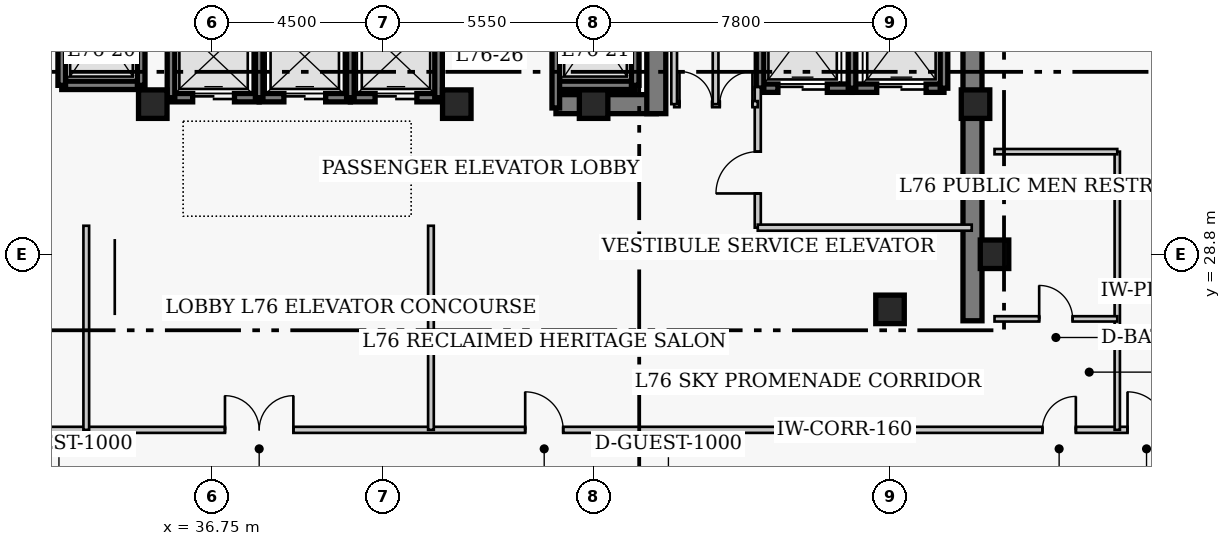
"""IFC4 building model, lengths in metres.
Left out: names, types, materials, properties, quantities, classifications, styles, units other than length and angle.
Written with IfcOpenShell. Run it as: python <this file> out.ifc"""

import sys

from ifc_helpers import new_model, si_unit, direction, frame, frame_2d, origin, origin_2d, place, context, subcontext, project, spatial, rectangle, extrude, element, fill, save


model = new_model("IFC4")
c1 = context("Model", 3, precision=1e-05, world=origin(), true_north=direction((0.0, 1.0)))
c2 = subcontext(c1, "Body", "Model", "MODEL_VIEW")
j1 = project(units=[si_unit("LENGTHUNIT", "METRE"), si_unit("PLANEANGLEUNIT", "RADIAN")], contexts=[c1])
p1 = place(None, origin())
s1 = spatial("IfcSite", under=j1, at=p1, CompositionType="ELEMENT")
p2 = place(p1, origin())
s2 = spatial("IfcBuilding", under=s1, at=p2, CompositionType="ELEMENT")
p3 = place(p2, frame((0.0, 0.0, 306.6)))
s3 = spatial("IfcBuildingStorey", under=s2, at=p3, CompositionType="ELEMENT", Elevation=306.6)
p4 = place(p3, frame((56.77, 27.05, 0.0), z_axis=(0.0, 0.0, 1.0), x_axis=(0.0, 1.0, 0.0)))
e1 = element("IfcWall", 1, at=p4, inside=s3, PredefinedType="SHEAR", context=c2, shape_type="SweptSolid", body=[
    extrude(rectangle(XDim=13.52, YDim=0.5, at=frame_2d((6.76, 0.0))), origin(), (0.0, 0.0, 1.0), 4.8),
])
p5 = place(p3, frame((45.81, 32.75, 0.0), z_axis=(0.0, 0.0, 1.0), x_axis=(1.0, 0.0, 0.0)))
e2 = element("IfcWall", 2, at=p5, inside=s3, PredefinedType="SHEAR", context=c2, shape_type="SweptSolid", body=[
    extrude(rectangle(XDim=2.64, YDim=0.5, at=frame_2d((1.32, 0.0))), origin(), (0.0, 0.0, 1.0), 4.8),
])
p6 = place(p3, frame((48.45, 32.5, 0.0), z_axis=(0.0, 0.0, 1.0), x_axis=(0.0, 1.0, 0.0)))
e3 = element("IfcWall", 3, at=p6, inside=s3, PredefinedType="SHEAR", context=c2, shape_type="SweptSolid", body=[
    extrude(rectangle(XDim=7.82, YDim=0.5, at=frame_2d((3.91, 0.0))), origin(), (0.0, 0.0, 1.0), 4.8),
])
p7 = place(p6, frame((5.7, 0.0, 0.0)))
e4 = element("IfcOpeningElement", 4, at=p7, cuts=e3, PredefinedType="OPENING", context=c2, shape_type="SweptSolid", body=[
    extrude(rectangle(XDim=1.1, YDim=2.15, at=frame_2d((0.55, 1.075))), frame((0.0, 0.26, 0.0), z_axis=(0.0, -1.0, 0.0), x_axis=(1.0, 0.0, 0.0)), (0.0, 0.0, 1.0), 0.52),
])
for number, where, z_axis, x_axis in (
    (5, (57.35, 28.8, 0.0), (0.0, 0.0, 1.0), (1.0, 0.0, 0.0)),
    (6, (35.2, 32.75, 0.0), (0.0, 0.0, 1.0), (1.0, 0.0, 0.0)),
    (7, (43.2, 32.75, 0.0), (0.0, 0.0, 1.0), (1.0, 0.0, 0.0)),
    (8, (46.8, 32.75, 0.0), (0.0, 0.0, 1.0), (1.0, 0.0, 0.0)),
    (9, (54.6, 27.35, 0.0), (0.0, 0.0, 1.0), (1.0, 0.0, 0.0)),
    (10, (56.85, 32.75, 0.0), (0.0, 0.0, 1.0), (1.0, 0.0, 0.0)),
):
    element("IfcColumn", number, at=place(p3, frame(where, z_axis=z_axis, x_axis=x_axis)), inside=s3, PredefinedType="COLUMN", context=c2, shape_type="SweptSolid", body=[
        extrude(rectangle(XDim=0.75, YDim=0.75, at=origin_2d()), origin(), (0.0, 0.0, 1.0), 4.8),
    ])
p8 = place(p3, frame((35.68, 32.92, 0.0), z_axis=(0.0, 0.0, 1.0), x_axis=(1.0, 0.0, 0.0)))
e11 = element("IfcWall", 11, at=p8, inside=s3, PredefinedType="SHEAR", context=c2, shape_type="SweptSolid", body=[
    extrude(rectangle(XDim=2.32, YDim=0.22, at=frame_2d((1.16, 0.0))), origin(), (0.0, 0.0, 1.0), 4.8),
])
p9 = place(p8, frame((0.57, 0.0, 0.0)))
e12 = element("IfcOpeningElement", 12, at=p9, cuts=e11, PredefinedType="OPENING", context=c2, shape_type="SweptSolid", body=[
    extrude(rectangle(XDim=1.1, YDim=2.15, at=frame_2d((0.55, 1.075))), frame((0.0, 0.12, 0.0), z_axis=(0.0, -1.0, 0.0), x_axis=(1.0, 0.0, 0.0)), (0.0, 0.0, 1.0), 0.24),
])
p10 = place(p3, frame((35.68, 32.92, 0.0), z_axis=(0.0, 0.0, 1.0), x_axis=(0.0, 1.0, 0.0)))
e13 = element("IfcWall", 13, at=p10, inside=s3, PredefinedType="SHEAR", context=c2, shape_type="SweptSolid", body=[
    extrude(rectangle(XDim=2.16, YDim=0.2, at=frame_2d((1.08, 0.0))), origin(), (0.0, 0.0, 1.0), 4.8),
])
p11 = place(p3, frame((38.0, 32.92, 0.0), z_axis=(0.0, 0.0, 1.0), x_axis=(1.0, 0.0, 0.0)))
e14 = element("IfcWall", 14, at=p11, inside=s3, PredefinedType="SHEAR", context=c2, shape_type="SweptSolid", body=[
    extrude(rectangle(XDim=2.4, YDim=0.22, at=frame_2d((1.2, 0.0))), origin(), (0.0, 0.0, 1.0), 4.8),
])
p12 = place(p11, frame((0.65, 0.0, 0.0)))
e15 = element("IfcOpeningElement", 15, at=p12, cuts=e14, PredefinedType="OPENING", context=c2, shape_type="SweptSolid", body=[
    extrude(rectangle(XDim=1.1, YDim=2.15, at=frame_2d((0.55, 1.075))), frame((0.0, 0.12, 0.0), z_axis=(0.0, -1.0, 0.0), x_axis=(1.0, 0.0, 0.0)), (0.0, 0.0, 1.0), 0.24),
])
p13 = place(p3, frame((38.0, 32.92, 0.0), z_axis=(0.0, 0.0, 1.0), x_axis=(0.0, 1.0, 0.0)))
e16 = element("IfcWall", 16, at=p13, inside=s3, PredefinedType="SHEAR", context=c2, shape_type="SweptSolid", body=[
    extrude(rectangle(XDim=2.16, YDim=0.2, at=frame_2d((1.08, 0.0))), origin(), (0.0, 0.0, 1.0), 4.8),
])
p14 = place(p3, frame((40.4, 32.92, 0.0), z_axis=(0.0, 0.0, 1.0), x_axis=(1.0, 0.0, 0.0)))
e17 = element("IfcWall", 17, at=p14, inside=s3, PredefinedType="SHEAR", context=c2, shape_type="SweptSolid", body=[
    extrude(rectangle(XDim=2.32, YDim=0.22, at=frame_2d((1.16, 0.0))), origin(), (0.0, 0.0, 1.0), 4.8),
])
p15 = place(p14, frame((0.65, 0.0, 0.0)))
e18 = element("IfcOpeningElement", 18, at=p15, cuts=e17, PredefinedType="OPENING", context=c2, shape_type="SweptSolid", body=[
    extrude(rectangle(XDim=1.1, YDim=2.15, at=frame_2d((0.55, 1.075))), frame((0.0, 0.12, 0.0), z_axis=(0.0, -1.0, 0.0), x_axis=(1.0, 0.0, 0.0)), (0.0, 0.0, 1.0), 0.24),
])
for number, where, z_axis, x_axis in (
    (19, (40.4, 32.92, 0.0), (0.0, 0.0, 1.0), (0.0, 1.0, 0.0)),
    (20, (42.72, 32.92, 0.0), (0.0, 0.0, 1.0), (0.0, 1.0, 0.0)),
):
    element("IfcWall", number, at=place(p3, frame(where, z_axis=z_axis, x_axis=x_axis)), inside=s3, PredefinedType="SHEAR", context=c2, shape_type="SweptSolid", body=[
        extrude(rectangle(XDim=2.16, YDim=0.2, at=frame_2d((1.08, 0.0))), origin(), (0.0, 0.0, 1.0), 4.8),
    ])
p16 = place(p3, frame((51.18, 33.17, 0.0), z_axis=(0.0, 0.0, 1.0), x_axis=(1.0, 0.0, 0.0)))
e21 = element("IfcWall", 21, at=p16, inside=s3, PredefinedType="SHEAR", context=c2, shape_type="SweptSolid", body=[
    extrude(rectangle(XDim=2.42, YDim=0.22, at=frame_2d((1.21, 0.0))), origin(), (0.0, 0.0, 1.0), 4.8),
])
p17 = place(p16, frame((0.47, 0.0, 0.0)))
e22 = element("IfcOpeningElement", 22, at=p17, cuts=e21, PredefinedType="OPENING", context=c2, shape_type="SweptSolid", body=[
    extrude(rectangle(XDim=1.3, YDim=2.15, at=frame_2d((0.65, 1.075))), frame((0.0, 0.12, 0.0), z_axis=(0.0, -1.0, 0.0), x_axis=(1.0, 0.0, 0.0)), (0.0, 0.0, 1.0), 0.24),
])
p18 = place(p3, frame((51.18, 33.17, 0.0), z_axis=(0.0, 0.0, 1.0), x_axis=(0.0, 1.0, 0.0)))
e23 = element("IfcWall", 23, at=p18, inside=s3, PredefinedType="SHEAR", context=c2, shape_type="SweptSolid", body=[
    extrude(rectangle(XDim=2.86, YDim=0.2, at=frame_2d((1.43, 0.0))), origin(), (0.0, 0.0, 1.0), 4.8),
])
p19 = place(p3, frame((53.6, 33.17, 0.0), z_axis=(0.0, 0.0, 1.0), x_axis=(1.0, 0.0, 0.0)))
e24 = element("IfcWall", 24, at=p19, inside=s3, PredefinedType="SHEAR", context=c2, shape_type="SweptSolid", body=[
    extrude(rectangle(XDim=2.42, YDim=0.22, at=frame_2d((1.21, 0.0))), origin(), (0.0, 0.0, 1.0), 4.8),
])
p20 = place(p19, frame((0.65, 0.0, 0.0)))
e25 = element("IfcOpeningElement", 25, at=p20, cuts=e24, PredefinedType="OPENING", context=c2, shape_type="SweptSolid", body=[
    extrude(rectangle(XDim=1.3, YDim=2.15, at=frame_2d((0.65, 1.075))), frame((0.0, 0.12, 0.0), z_axis=(0.0, -1.0, 0.0), x_axis=(1.0, 0.0, 0.0)), (0.0, 0.0, 1.0), 0.24),
])
for number, where, z_axis, x_axis in (
    (26, (53.6, 33.17, 0.0), (0.0, 0.0, 1.0), (0.0, 1.0, 0.0)),
    (27, (56.02, 33.17, 0.0), (0.0, 0.0, 1.0), (0.0, 1.0, 0.0)),
):
    element("IfcWall", number, at=place(p3, frame(where, z_axis=z_axis, x_axis=x_axis)), inside=s3, PredefinedType="SHEAR", context=c2, shape_type="SweptSolid", body=[
        extrude(rectangle(XDim=2.86, YDim=0.2, at=frame_2d((1.43, 0.0))), origin(), (0.0, 0.0, 1.0), 4.8),
    ])
p21 = place(p3, frame((32.805, 33.245, 0.0), z_axis=(0.0, 0.0, 1.0), x_axis=(1.0, 0.0, 0.0)))
e28 = element("IfcWall", 28, at=p21, inside=s3, PredefinedType="SHEAR", context=c2, shape_type="SweptSolid", body=[
    extrude(rectangle(XDim=2.09, YDim=0.22, at=frame_2d((1.045, 0.0))), origin(), (0.0, 0.0, 1.0), 4.8),
])
for number, where, z_axis, x_axis in (
    (29, (32.805, 33.245, 0.0), (0.0, 0.0, 1.0), (0.0, 1.0, 0.0)),
    (30, (34.895, 33.245, 0.0), (0.0, 0.0, 1.0), (0.0, 1.0, 0.0)),
):
    element("IfcWall", number, at=place(p3, frame(where, z_axis=z_axis, x_axis=x_axis)), inside=s3, PredefinedType="SHEAR", context=c2, shape_type="SweptSolid", body=[
        extrude(rectangle(XDim=2.91, YDim=0.2, at=frame_2d((1.455, 0.0))), origin(), (0.0, 0.0, 1.0), 4.8),
    ])
p22 = place(p3, frame((45.805, 33.245, 0.0), z_axis=(0.0, 0.0, 1.0), x_axis=(1.0, 0.0, 0.0)))
e31 = element("IfcWall", 31, at=p22, inside=s3, PredefinedType="SHEAR", context=c2, shape_type="SweptSolid", body=[
    extrude(rectangle(XDim=2.09, YDim=0.22, at=frame_2d((1.045, 0.0))), origin(), (0.0, 0.0, 1.0), 4.8),
])
p23 = place(p3, frame((45.805, 32.65, 0.0), z_axis=(0.0, 0.0, 1.0), x_axis=(0.0, 1.0, 0.0)))
e32 = element("IfcWall", 32, at=p23, inside=s3, PredefinedType="SHEAR", context=c2, shape_type="SweptSolid", body=[
    extrude(rectangle(XDim=3.505, YDim=0.2, at=frame_2d((1.752, 0.0))), origin(), (0.0, 0.0, 1.0), 4.8),
])
p24 = place(p3, frame((47.895, 33.245, 0.0), z_axis=(0.0, 0.0, 1.0), x_axis=(0.0, 1.0, 0.0)))
e33 = element("IfcWall", 33, at=p24, inside=s3, PredefinedType="SHEAR", context=c2, shape_type="SweptSolid", body=[
    extrude(rectangle(XDim=2.91, YDim=0.2, at=frame_2d((1.455, 0.0))), origin(), (0.0, 0.0, 1.0), 4.8),
])
p25 = place(p3, frame((51.12, 29.5, 0.0), z_axis=(0.0, 0.0, 1.0), x_axis=(0.0, 1.0, 0.0)))
e34 = element("IfcWall", 34, at=p25, inside=s3, PredefinedType="PARTITIONING", context=c2, shape_type="SweptSolid", body=[
    extrude(rectangle(XDim=3.7, YDim=0.16, at=frame_2d((1.85, 0.0))), origin(), (0.0, 0.0, 1.0), 4.45),
])
p26 = place(p25, frame((0.9, 0.0, 0.0)))
e35 = element("IfcOpeningElement", 35, at=p26, cuts=e34, PredefinedType="OPENING", context=c2, shape_type="SweptSolid", body=[
    extrude(rectangle(XDim=1.1, YDim=2.15, at=frame_2d((0.55, 1.075))), frame((0.0, 0.09, 0.0), z_axis=(0.0, -1.0, 0.0), x_axis=(1.0, 0.0, 0.0)), (0.0, 0.0, 1.0), 0.18),
])
p27 = place(p3, frame((51.12, 29.5, 0.0), z_axis=(0.0, 0.0, 1.0), x_axis=(1.0, 0.0, 0.0)))
e36 = element("IfcWall", 36, at=p27, inside=s3, PredefinedType="PARTITIONING", context=c2, shape_type="SweptSolid", body=[
    extrude(rectangle(XDim=5.63, YDim=0.16, at=frame_2d((2.815, 0.0))), origin(), (0.0, 0.0, 1.0), 4.45),
])
p28 = place(p3, frame((48.92, 32.75, 0.0), z_axis=(0.0, 0.0, 1.0), x_axis=(1.0, 0.0, 0.0)))
e37 = element("IfcWall", 37, at=p28, inside=s3, PredefinedType="PARTITIONING", context=c2, shape_type="SweptSolid", body=[
    extrude(rectangle(XDim=2.2, YDim=0.16, at=frame_2d((1.1, 0.0))), origin(), (0.0, 0.0, 1.0), 4.45),
])
p29 = place(p28, frame((0.14, 0.0, 0.0)))
e38 = element("IfcOpeningElement", 38, at=p29, cuts=e37, PredefinedType="OPENING", context=c2, shape_type="SweptSolid", body=[
    extrude(rectangle(XDim=0.86, YDim=2.05, at=frame_2d((0.43, 1.025))), frame((0.0, 0.09, 0.0), z_axis=(0.0, -1.0, 0.0), x_axis=(1.0, 0.0, 0.0)), (0.0, 0.0, 1.0), 0.18),
])
p30 = place(p28, frame((1.2, 0.0, 0.0)))
e39 = element("IfcOpeningElement", 39, at=p30, cuts=e37, PredefinedType="OPENING", context=c2, shape_type="SweptSolid", body=[
    extrude(rectangle(XDim=0.86, YDim=2.05, at=frame_2d((0.43, 1.025))), frame((0.0, 0.09, 0.0), z_axis=(0.0, -1.0, 0.0), x_axis=(1.0, 0.0, 0.0)), (0.0, 0.0, 1.0), 0.18),
])
for number, where, z_axis, x_axis in (
    (40, (48.92, 32.75, 0.0), (0.0, 0.0, 1.0), (0.0, 1.0, 0.0)),
    (41, (50.01, 32.75, 0.0), (0.0, 0.0, 1.0), (0.0, 1.0, 0.0)),
):
    element("IfcWall", number, at=place(p3, frame(where, z_axis=z_axis, x_axis=x_axis)), inside=s3, PredefinedType="PARTITIONING", context=c2, shape_type="SweptSolid", body=[
        extrude(rectangle(XDim=3.62, YDim=0.15, at=frame_2d((1.81, 0.0))), origin(), (0.0, 0.0, 1.0), 4.45),
    ])
p31 = place(p3, frame((11.7, 24.18, 0.0), z_axis=(0.0, 0.0, 1.0), x_axis=(1.0, 0.0, 0.0)))
e42 = element("IfcWall", 42, at=p31, inside=s3, PredefinedType="PARTITIONING", context=c2, shape_type="SweptSolid", body=[
    extrude(rectangle(XDim=54.6, YDim=0.16, at=frame_2d((27.3, 0.0))), origin(), (0.0, 0.0, 1.0), 4.45),
])
p32 = place(p31, frame((25.4, 0.0, 0.0)))
e43 = element("IfcOpeningElement", 43, at=p32, cuts=e42, PredefinedType="OPENING", context=c2, shape_type="SweptSolid", body=[
    extrude(rectangle(XDim=1.8, YDim=2.2, at=frame_2d((0.9, 1.1))), frame((0.0, 0.09, 0.0), z_axis=(0.0, -1.0, 0.0), x_axis=(1.0, 0.0, 0.0)), (0.0, 0.0, 1.0), 0.18),
])
p33 = place(p31, frame((16.05, 0.0, 0.0)))
e44 = element("IfcOpeningElement", 44, at=p33, cuts=e42, PredefinedType="OPENING", context=c2, shape_type="SweptSolid", body=[
    extrude(rectangle(XDim=1.0, YDim=2.15, at=frame_2d((0.5, 1.075))), frame((0.0, 0.09, 0.0), z_axis=(0.0, -1.0, 0.0), x_axis=(1.0, 0.0, 0.0)), (0.0, 0.0, 1.0), 0.18),
])
p34 = place(p31, frame((33.3, 0.0, 0.0)))
e45 = element("IfcOpeningElement", 45, at=p34, cuts=e42, PredefinedType="OPENING", context=c2, shape_type="SweptSolid", body=[
    extrude(rectangle(XDim=1.0, YDim=2.15, at=frame_2d((0.5, 1.075))), frame((0.0, 0.09, 0.0), z_axis=(0.0, -1.0, 0.0), x_axis=(1.0, 0.0, 0.0)), (0.0, 0.0, 1.0), 0.18),
])
p35 = place(p31, frame((4.55, 0.0, 0.0)))
e46 = element("IfcOpeningElement", 46, at=p35, cuts=e42, PredefinedType="OPENING", context=c2, shape_type="SweptSolid", body=[
    extrude(rectangle(XDim=1.0, YDim=2.15, at=frame_2d((0.5, 1.075))), frame((0.0, 0.09, 0.0), z_axis=(0.0, -1.0, 0.0), x_axis=(1.0, 0.0, 0.0)), (0.0, 0.0, 1.0), 0.18),
])
p36 = place(p31, frame((46.91, 0.0, 0.0)))
e47 = element("IfcOpeningElement", 47, at=p36, cuts=e42, PredefinedType="OPENING", context=c2, shape_type="SweptSolid", body=[
    extrude(rectangle(XDim=0.88, YDim=2.05, at=frame_2d((0.44, 1.025))), frame((0.0, 0.09, 0.0), z_axis=(0.0, -1.0, 0.0), x_axis=(1.0, 0.0, 0.0)), (0.0, 0.0, 1.0), 0.18),
])
p37 = place(p31, frame((49.15, 0.0, 0.0)))
e48 = element("IfcOpeningElement", 48, at=p37, cuts=e42, PredefinedType="OPENING", context=c2, shape_type="SweptSolid", body=[
    extrude(rectangle(XDim=1.0, YDim=2.15, at=frame_2d((0.5, 1.075))), frame((0.0, 0.09, 0.0), z_axis=(0.0, -1.0, 0.0), x_axis=(1.0, 0.0, 0.0)), (0.0, 0.0, 1.0), 0.18),
])
for number, where, z_axis, x_axis in (
    (49, (33.45, 24.18, 0.0), (0.0, 0.0, 1.0), (0.0, 1.0, 0.0)),
    (50, (42.52, 24.18, 0.0), (0.0, 0.0, 1.0), (0.0, 1.0, 0.0)),
):
    element("IfcWall", number, at=place(p3, frame(where, z_axis=z_axis, x_axis=x_axis)), inside=s3, PredefinedType="PARTITIONING", context=c2, shape_type="SweptSolid", body=[
        extrude(rectangle(XDim=5.37, YDim=0.15, at=frame_2d((2.685, 0.0))), origin(), (0.0, 0.0, 1.0), 4.45),
    ])
p38 = place(p3, frame((60.58, 24.18, 0.0), z_axis=(0.0, 0.0, 1.0), x_axis=(0.0, 1.0, 0.0)))
e51 = element("IfcWall", 51, at=p38, inside=s3, PredefinedType="PLUMBINGWALL", context=c2, shape_type="SweptSolid", body=[
    extrude(rectangle(XDim=7.32, YDim=0.14, at=frame_2d((3.66, 0.0))), origin(), (0.0, 0.0, 1.0), 4.45),
])
p39 = place(p3, frame((57.35, 27.1, 0.0), z_axis=(0.0, 0.0, 1.0), x_axis=(1.0, 0.0, 0.0)))
e52 = element("IfcWall", 52, at=p39, inside=s3, PredefinedType="PLUMBINGWALL", context=c2, shape_type="SweptSolid", body=[
    extrude(rectangle(XDim=3.23, YDim=0.14, at=frame_2d((1.615, 0.0))), origin(), (0.0, 0.0, 1.0), 4.45),
])
p40 = place(p39, frame((1.175, 0.0, 0.0)))
e53 = element("IfcOpeningElement", 53, at=p40, cuts=e52, PredefinedType="OPENING", context=c2, shape_type="SweptSolid", body=[
    extrude(rectangle(XDim=0.88, YDim=2.05, at=frame_2d((0.44, 1.025))), frame((0.0, 0.08, 0.0), z_axis=(0.0, -1.0, 0.0), x_axis=(1.0, 0.0, 0.0)), (0.0, 0.0, 1.0), 0.16),
])
p41 = place(p3, frame((57.35, 31.5, 0.0), z_axis=(0.0, 0.0, 1.0), x_axis=(1.0, 0.0, 0.0)))
e54 = element("IfcWall", 54, at=p41, inside=s3, PredefinedType="PLUMBINGWALL", context=c2, shape_type="SweptSolid", body=[
    extrude(rectangle(XDim=3.23, YDim=0.14, at=frame_2d((1.615, 0.0))), origin(), (0.0, 0.0, 1.0), 4.45),
])
p42 = place(p9, origin())
e55 = element("IfcDoor", 55, at=p42, inside=s3, OperationType="DOUBLE_DOOR_SLIDING", PredefinedType="DOOR", context=c2, shape_type="SweptSolid", body=[
    extrude(rectangle(XDim=1.1, YDim=2.15, at=frame_2d((0.55, 1.075))), frame((0.0, 0.025, 0.0), z_axis=(0.0, -1.0, 0.0), x_axis=(1.0, 0.0, 0.0)), (0.0, 0.0, 1.0), 0.05),
])
fill(e12, e55)
p43 = place(p12, origin())
e56 = element("IfcDoor", 56, at=p43, inside=s3, OperationType="DOUBLE_DOOR_SLIDING", PredefinedType="DOOR", context=c2, shape_type="SweptSolid", body=[
    extrude(rectangle(XDim=1.1, YDim=2.15, at=frame_2d((0.55, 1.075))), frame((0.0, 0.025, 0.0), z_axis=(0.0, -1.0, 0.0), x_axis=(1.0, 0.0, 0.0)), (0.0, 0.0, 1.0), 0.05),
])
fill(e15, e56)
p44 = place(p15, origin())
e57 = element("IfcDoor", 57, at=p44, inside=s3, OperationType="DOUBLE_DOOR_SLIDING", PredefinedType="DOOR", context=c2, shape_type="SweptSolid", body=[
    extrude(rectangle(XDim=1.1, YDim=2.15, at=frame_2d((0.55, 1.075))), frame((0.0, 0.025, 0.0), z_axis=(0.0, -1.0, 0.0), x_axis=(1.0, 0.0, 0.0)), (0.0, 0.0, 1.0), 0.05),
])
fill(e18, e57)
p45 = place(p17, origin())
e58 = element("IfcDoor", 58, at=p45, inside=s3, OperationType="DOUBLE_DOOR_SLIDING", PredefinedType="DOOR", context=c2, shape_type="SweptSolid", body=[
    extrude(rectangle(XDim=1.3, YDim=2.15, at=frame_2d((0.65, 1.075))), frame((0.0, 0.025, 0.0), z_axis=(0.0, -1.0, 0.0), x_axis=(1.0, 0.0, 0.0)), (0.0, 0.0, 1.0), 0.05),
])
fill(e22, e58)
p46 = place(p20, origin())
e59 = element("IfcDoor", 59, at=p46, inside=s3, OperationType="DOUBLE_DOOR_SLIDING", PredefinedType="DOOR", context=c2, shape_type="SweptSolid", body=[
    extrude(rectangle(XDim=1.3, YDim=2.15, at=frame_2d((0.65, 1.075))), frame((0.0, 0.025, 0.0), z_axis=(0.0, -1.0, 0.0), x_axis=(1.0, 0.0, 0.0)), (0.0, 0.0, 1.0), 0.05),
])
fill(e25, e59)
p47 = place(p26, origin())
e60 = element("IfcDoor", 60, at=p47, inside=s3, OperationType="SINGLE_SWING_LEFT", PredefinedType="DOOR", context=c2, shape_type="SweptSolid", body=[
    extrude(rectangle(XDim=1.1, YDim=2.15, at=frame_2d((0.55, 1.075))), frame((0.0, 0.025, 0.0), z_axis=(0.0, -1.0, 0.0), x_axis=(1.0, 0.0, 0.0)), (0.0, 0.0, 1.0), 0.05),
])
fill(e35, e60)
p48 = place(p29, origin())
e61 = element("IfcDoor", 61, at=p48, inside=s3, OperationType="SINGLE_SWING_LEFT", PredefinedType="DOOR", context=c2, shape_type="SweptSolid", body=[
    extrude(rectangle(XDim=0.86, YDim=2.05, at=frame_2d((0.43, 1.025))), frame((0.0, 0.025, 0.0), z_axis=(0.0, -1.0, 0.0), x_axis=(1.0, 0.0, 0.0)), (0.0, 0.0, 1.0), 0.05),
])
fill(e38, e61)
p49 = place(p30, origin())
e62 = element("IfcDoor", 62, at=p49, inside=s3, OperationType="SINGLE_SWING_RIGHT", PredefinedType="DOOR", context=c2, shape_type="SweptSolid", body=[
    extrude(rectangle(XDim=0.86, YDim=2.05, at=frame_2d((0.43, 1.025))), frame((0.0, 0.025, 0.0), z_axis=(0.0, -1.0, 0.0), x_axis=(1.0, 0.0, 0.0)), (0.0, 0.0, 1.0), 0.05),
])
fill(e39, e62)
p50 = place(p32, origin())
e63 = element("IfcDoor", 63, at=p50, inside=s3, OperationType="DOUBLE_DOOR_SINGLE_SWING", PredefinedType="DOOR", context=c2, shape_type="SweptSolid", body=[
    extrude(rectangle(XDim=1.8, YDim=2.2, at=frame_2d((0.9, 1.1))), frame((0.0, 0.025, 0.0), z_axis=(0.0, -1.0, 0.0), x_axis=(1.0, 0.0, 0.0)), (0.0, 0.0, 1.0), 0.05),
])
fill(e43, e63)
p51 = place(p34, origin())
e64 = element("IfcDoor", 64, at=p51, inside=s3, OperationType="SINGLE_SWING_LEFT", PredefinedType="DOOR", context=c2, shape_type="SweptSolid", body=[
    extrude(rectangle(XDim=1.0, YDim=2.15, at=frame_2d((0.5, 1.075))), frame((0.0, 0.025, 0.0), z_axis=(0.0, -1.0, 0.0), x_axis=(1.0, 0.0, 0.0)), (0.0, 0.0, 1.0), 0.05),
])
fill(e45, e64)
p52 = place(p36, origin())
e65 = element("IfcDoor", 65, at=p52, inside=s3, OperationType="SINGLE_SWING_RIGHT", PredefinedType="DOOR", context=c2, shape_type="SweptSolid", body=[
    extrude(rectangle(XDim=0.88, YDim=2.05, at=frame_2d((0.44, 1.025))), frame((0.0, 0.025, 0.0), z_axis=(0.0, -1.0, 0.0), x_axis=(1.0, 0.0, 0.0)), (0.0, 0.0, 1.0), 0.05),
])
fill(e47, e65)
p53 = place(p40, origin())
e66 = element("IfcDoor", 66, at=p53, inside=s3, OperationType="SINGLE_SWING_LEFT", PredefinedType="DOOR", context=c2, shape_type="SweptSolid", body=[
    extrude(rectangle(XDim=0.88, YDim=2.05, at=frame_2d((0.44, 1.025))), frame((0.0, 0.025, 0.0), z_axis=(0.0, -1.0, 0.0), x_axis=(1.0, 0.0, 0.0)), (0.0, 0.0, 1.0), 0.05),
])
fill(e53, e66)
p54 = place(p37, origin())
e67 = element("IfcDoor", 67, at=p54, inside=s3, OperationType="SINGLE_SWING_LEFT", PredefinedType="DOOR", context=c2, shape_type="SweptSolid", body=[
    extrude(rectangle(XDim=1.0, YDim=2.15, at=frame_2d((0.5, 1.075))), frame((0.0, 0.025, 0.0), z_axis=(0.0, -1.0, 0.0), x_axis=(1.0, 0.0, 0.0)), (0.0, 0.0, 1.0), 0.05),
])
fill(e48, e67)
save(model, sys.argv[1])
